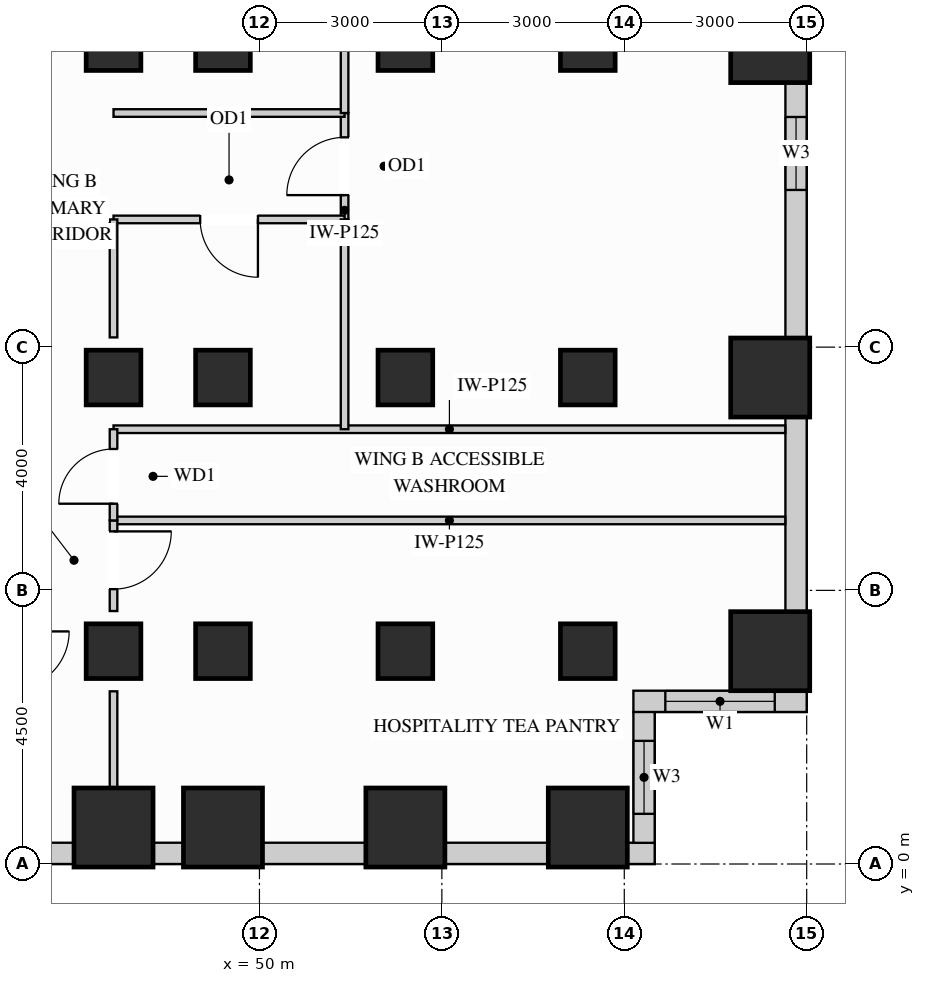
"""IFC4 building model, lengths in metres.
Left out: names, types, materials, properties, quantities, classifications, styles, units other than length and angle.
Written with IfcOpenShell. Run it as: python <this file> out.ifc"""

import sys

from ifc_helpers import new_model, si_unit, direction, frame, frame_2d, origin, origin_2d, place, context, subcontext, project, spatial, rectangle, extrude, source, transform, mapped, element, fill, save


model = new_model("IFC4")
c1 = context("Model", 3, precision=1e-05, world=origin(), true_north=direction((0.0, 1.0)))
c2 = subcontext(c1, "Body", "Model", "MODEL_VIEW")
j1 = project(units=[si_unit("LENGTHUNIT", "METRE"), si_unit("PLANEANGLEUNIT", "RADIAN")], contexts=[c1])
p1 = place(None, origin())
s1 = spatial("IfcSite", under=j1, at=p1, CompositionType="ELEMENT")
p2 = place(p1, origin())
s2 = spatial("IfcBuilding", under=s1, at=p2, CompositionType="ELEMENT")
p3 = place(p2, frame((0.0, 0.0, 62.1)))
s3 = spatial("IfcBuildingStorey", under=s2, at=p3, CompositionType="ELEMENT", Elevation=62.1)
m1 = source(origin(), c2, "Body", "SweptSolid", [
    extrude(rectangle(XDim=0.9, YDim=0.9, at=origin_2d()), origin(), (0.0, 0.0, 1.0), 3.38),
])
for number, where, z_axis, x_axis in (
    (1, (47.6, 13.5, 0.0), (0.0, 0.0, 1.0), (1.0, 0.0, 0.0)),
    (2, (47.6, 3.5, 0.0), (0.0, 0.0, 1.0), (1.0, 0.0, 0.0)),
    (3, (47.6, 8.0, 0.0), (0.0, 0.0, 1.0), (1.0, 0.0, 0.0)),
    (4, (49.4, 13.5, 0.0), (0.0, 0.0, 1.0), (1.0, 0.0, 0.0)),
    (5, (49.4, 3.5, 0.0), (0.0, 0.0, 1.0), (1.0, 0.0, 0.0)),
    (6, (49.4, 8.0, 0.0), (0.0, 0.0, 1.0), (1.0, 0.0, 0.0)),
    (7, (52.4, 13.5, 0.0), (0.0, 0.0, 1.0), (1.0, 0.0, 0.0)),
    (8, (52.4, 3.5, 0.0), (0.0, 0.0, 1.0), (1.0, 0.0, 0.0)),
    (9, (52.4, 8.0, 0.0), (0.0, 0.0, 1.0), (1.0, 0.0, 0.0)),
    (10, (55.4, 13.5, 0.0), (0.0, 0.0, 1.0), (1.0, 0.0, 0.0)),
    (11, (55.4, 3.5, 0.0), (0.0, 0.0, 1.0), (1.0, 0.0, 0.0)),
    (12, (55.4, 8.0, 0.0), (0.0, 0.0, 1.0), (1.0, 0.0, 0.0)),
):
    element("IfcColumn", number, at=place(p3, frame(where, z_axis=z_axis, x_axis=x_axis)), inside=s3, PredefinedType="COLUMN", context=c2, shape_type="MappedRepresentation", body=[
        mapped(m1, transform((0.0, 0.0, 0.0), x_axis=(1.0, 0.0, 0.0), y_axis=(0.0, 1.0, 0.0), z_axis=(0.0, 0.0, 1.0))),
    ])
m2 = source(origin(), c2, "Body", "SweptSolid", [
    extrude(rectangle(XDim=1.3, YDim=1.3, at=origin_2d()), origin(), (0.0, 0.0, 1.0), 3.38),
])
for number, where, z_axis, x_axis in (
    (13, (58.4, 13.5, 0.0), (0.0, 0.0, 1.0), (1.0, 0.0, 0.0)),
    (14, (58.4, 3.5, 0.0), (0.0, 0.0, 1.0), (1.0, 0.0, 0.0)),
    (15, (58.4, 8.0, 0.0), (0.0, 0.0, 1.0), (1.0, 0.0, 0.0)),
    (16, (47.6, 0.6, 0.0), (0.0, 0.0, 1.0), (1.0, 0.0, 0.0)),
    (17, (49.4, 0.6, 0.0), (0.0, 0.0, 1.0), (1.0, 0.0, 0.0)),
    (18, (52.4, 0.6, 0.0), (0.0, 0.0, 1.0), (1.0, 0.0, 0.0)),
    (19, (55.4, 0.6, 0.0), (0.0, 0.0, 1.0), (1.0, 0.0, 0.0)),
):
    element("IfcColumn", number, at=place(p3, frame(where, z_axis=z_axis, x_axis=x_axis)), inside=s3, PredefinedType="COLUMN", context=c2, shape_type="MappedRepresentation", body=[
        mapped(m2, transform((0.0, 0.0, 0.0), x_axis=(1.0, 0.0, 0.0), y_axis=(0.0, 1.0, 0.0), z_axis=(0.0, 0.0, 1.0))),
    ])
p4 = place(p3, frame((40.648, 0.175, 0.0), z_axis=(0.0, 0.0, 1.0), x_axis=(1.0, 0.0, 0.0)))
e20 = element("IfcWall", 20, at=p4, inside=s3, PredefinedType="SOLIDWALL", context=c2, shape_type="SweptSolid", body=[
    extrude(rectangle(XDim=6.304, YDim=0.35, at=frame_2d((3.152, 0.0))), origin(), (0.0, 0.0, 1.0), 2.51),
])
p5 = place(p4, frame((0.687, 0.0, 0.78)))
e21 = element("IfcOpeningElement", 21, at=p5, cuts=e20, PredefinedType="OPENING", context=c2, shape_type="SweptSolid", body=[
    extrude(rectangle(XDim=1.8, YDim=1.55, at=frame_2d((0.9, 0.775))), frame((0.0, 0.185, 0.0), z_axis=(0.0, -1.0, 0.0), x_axis=(1.0, 0.0, 0.0)), (0.0, 0.0, 1.0), 0.37),
])
p6 = place(p4, frame((2.855, 0.0, 0.78)))
e22 = element("IfcOpeningElement", 22, at=p6, cuts=e20, PredefinedType="OPENING", context=c2, shape_type="SweptSolid", body=[
    extrude(rectangle(XDim=1.8, YDim=1.55, at=frame_2d((0.9, 0.775))), frame((0.0, 0.185, 0.0), z_axis=(0.0, -1.0, 0.0), x_axis=(1.0, 0.0, 0.0)), (0.0, 0.0, 1.0), 0.37),
])
m3 = source(origin(), c2, "Body", "SweptSolid", [
    extrude(rectangle(XDim=0.504, YDim=0.35, at=frame_2d((0.252, 0.0))), origin(), (0.0, 0.0, 1.0), 3.365),
])
p7 = place(p3, frame((48.248, 0.175, 0.0), z_axis=(0.0, 0.0, 1.0), x_axis=(1.0, 0.0, 0.0)))
e23 = element("IfcWall", 23, at=p7, inside=s3, PredefinedType="SOLIDWALL", context=c2, shape_type="MappedRepresentation", body=[
    mapped(m3, transform((0.0, 0.0, 0.0), x_axis=(1.0, 0.0, 0.0), y_axis=(0.0, 1.0, 0.0), z_axis=(0.0, 0.0, 1.0))),
])
m4 = source(origin(), c2, "Body", "SweptSolid", [
    extrude(rectangle(XDim=1.704, YDim=0.35, at=frame_2d((0.852, 0.0))), origin(), (0.0, 0.0, 1.0), 2.51),
])
for number, where, z_axis, x_axis in (
    (24, (50.048, 0.175, 0.0), (0.0, 0.0, 1.0), (1.0, 0.0, 0.0)),
    (25, (53.048, 0.175, 0.0), (0.0, 0.0, 1.0), (1.0, 0.0, 0.0)),
):
    element("IfcWall", number, at=place(p3, frame(where, z_axis=z_axis, x_axis=x_axis)), inside=s3, PredefinedType="SOLIDWALL", context=c2, shape_type="MappedRepresentation", body=[
        mapped(m4, transform((0.0, 0.0, 0.0), x_axis=(1.0, 0.0, 0.0), y_axis=(0.0, 1.0, 0.0), z_axis=(0.0, 0.0, 1.0))),
    ])
m5 = source(origin(), c2, "Body", "SweptSolid", [
    extrude(rectangle(XDim=0.452, YDim=0.35, at=frame_2d((0.226, 0.0))), origin(), (0.0, 0.0, 1.0), 3.365),
])
p8 = place(p3, frame((56.048, 0.175, 0.0), z_axis=(0.0, 0.0, 1.0), x_axis=(1.0, 0.0, 0.0)))
e26 = element("IfcWall", 26, at=p8, inside=s3, PredefinedType="SOLIDWALL", context=c2, shape_type="MappedRepresentation", body=[
    mapped(m5, transform((0.0, 0.0, 0.0), x_axis=(1.0, 0.0, 0.0), y_axis=(0.0, 1.0, 0.0), z_axis=(0.0, 0.0, 1.0))),
])
p9 = place(p3, frame((56.325, 0.348, 0.0), z_axis=(0.0, 0.0, 1.0), x_axis=(0.0, 1.0, 0.0)))
e27 = element("IfcWall", 27, at=p9, inside=s3, PredefinedType="SOLIDWALL", context=c2, shape_type="SweptSolid", body=[
    extrude(rectangle(XDim=2.154, YDim=0.35, at=frame_2d((1.077, 0.0))), origin(), (0.0, 0.0, 1.0), 3.365),
])
p10 = place(p9, frame((0.477, 0.0, 0.78)))
e28 = element("IfcOpeningElement", 28, at=p10, cuts=e27, PredefinedType="OPENING", context=c2, shape_type="SweptSolid", body=[
    extrude(rectangle(XDim=1.2, YDim=2.1, at=frame_2d((0.6, 1.05))), frame((0.0, 0.185, 0.0), z_axis=(0.0, -1.0, 0.0), x_axis=(1.0, 0.0, 0.0)), (0.0, 0.0, 1.0), 0.37),
])
p11 = place(p3, frame((56.15, 2.675, 0.0), z_axis=(0.0, 0.0, 1.0), x_axis=(1.0, 0.0, 0.0)))
e29 = element("IfcWall", 29, at=p11, inside=s3, PredefinedType="SOLIDWALL", context=c2, shape_type="SweptSolid", body=[
    extrude(rectangle(XDim=2.85, YDim=0.35, at=frame_2d((1.425, 0.0))), origin(), (0.0, 0.0, 1.0), 3.365),
])
p12 = place(p11, frame((0.525, 0.0, 0.78)))
e30 = element("IfcOpeningElement", 30, at=p12, cuts=e29, PredefinedType="OPENING", context=c2, shape_type="SweptSolid", body=[
    extrude(rectangle(XDim=1.8, YDim=2.1, at=frame_2d((0.9, 1.05))), frame((0.0, 0.185, 0.0), z_axis=(0.0, -1.0, 0.0), x_axis=(1.0, 0.0, 0.0)), (0.0, 0.0, 1.0), 0.37),
])
m6 = source(origin(), c2, "Body", "SweptSolid", [
    extrude(rectangle(XDim=3.204, YDim=0.35, at=frame_2d((1.602, 0.0))), origin(), (0.0, 0.0, 1.0), 2.51),
])
p13 = place(p3, frame((58.825, 4.148, 0.0), z_axis=(0.0, 0.0, 1.0), x_axis=(0.0, 1.0, 0.0)))
e31 = element("IfcWall", 31, at=p13, inside=s3, PredefinedType="SOLIDWALL", context=c2, shape_type="MappedRepresentation", body=[
    mapped(m6, transform((0.0, 0.0, 0.0), x_axis=(1.0, 0.0, 0.0), y_axis=(0.0, 1.0, 0.0), z_axis=(0.0, 0.0, 1.0))),
])
p14 = place(p3, frame((58.825, 8.648, 0.0), z_axis=(0.0, 0.0, 1.0), x_axis=(0.0, 1.0, 0.0)))
e32 = element("IfcWall", 32, at=p14, inside=s3, PredefinedType="SOLIDWALL", context=c2, shape_type="SweptSolid", body=[
    extrude(rectangle(XDim=4.204, YDim=0.35, at=frame_2d((2.102, 0.0))), origin(), (0.0, 0.0, 1.0), 2.51),
])
p15 = place(p14, frame((2.437, 0.0, 0.78)))
e33 = element("IfcOpeningElement", 33, at=p15, cuts=e32, PredefinedType="OPENING", context=c2, shape_type="SweptSolid", body=[
    extrude(rectangle(XDim=1.2, YDim=1.55, at=frame_2d((0.6, 0.775))), frame((0.0, 0.185, 0.0), z_axis=(0.0, -1.0, 0.0), x_axis=(1.0, 0.0, 0.0)), (0.0, 0.0, 1.0), 0.37),
])
p16 = place(p3, frame((51.4, 10.6, 0.0), z_axis=(0.0, 0.0, 1.0), x_axis=(0.0, 1.0, 0.0)))
e34 = element("IfcWall", 34, at=p16, inside=s3, PredefinedType="PARTITIONING", context=c2, shape_type="SweptSolid", body=[
    extrude(rectangle(XDim=1.75, YDim=0.125, at=frame_2d((0.875, 0.0))), origin(), (0.0, 0.0, 1.0), 3.365),
])
p17 = place(p16, frame((0.4, 0.0, 0.0)))
e35 = element("IfcOpeningElement", 35, at=p17, cuts=e34, PredefinedType="OPENING", context=c2, shape_type="SweptSolid", body=[
    extrude(rectangle(XDim=0.95, YDim=2.15, at=frame_2d((0.475, 1.075))), frame((0.0, 0.073, 0.0), z_axis=(0.0, -1.0, 0.0), x_axis=(1.0, 0.0, 0.0)), (0.0, 0.0, 1.0), 0.145),
])
m7 = source(origin(), c2, "Body", "SweptSolid", [
    extrude(rectangle(XDim=11.048, YDim=0.125, at=frame_2d((5.524, 0.0))), origin(), (0.0, 0.0, 1.0), 3.365),
])
for number, where, z_axis, x_axis in (
    (36, (47.6, 5.65, 0.0), (0.0, 0.0, 1.0), (1.0, 0.0, 0.0)),
    (37, (47.6, 7.15, 0.0), (0.0, 0.0, 1.0), (1.0, 0.0, 0.0)),
):
    element("IfcWall", number, at=place(p3, frame(where, z_axis=z_axis, x_axis=x_axis)), inside=s3, PredefinedType="PARTITIONING", context=c2, shape_type="MappedRepresentation", body=[
        mapped(m7, transform((0.0, 0.0, 0.0), x_axis=(1.0, 0.0, 0.0), y_axis=(0.0, 1.0, 0.0), z_axis=(0.0, 0.0, 1.0))),
    ])
m8 = source(origin(), c2, "Body", "SweptSolid", [
    extrude(rectangle(XDim=3.8, YDim=0.125, at=frame_2d((1.9, 0.0))), origin(), (0.0, 0.0, 1.0), 3.365),
])
p18 = place(p3, frame((47.6, 12.35, 0.0), z_axis=(0.0, 0.0, 1.0), x_axis=(1.0, 0.0, 0.0)))
e38 = element("IfcWall", 38, at=p18, inside=s3, PredefinedType="PARTITIONING", context=c2, shape_type="MappedRepresentation", body=[
    mapped(m8, transform((0.0, 0.0, 0.0), x_axis=(1.0, 0.0, 0.0), y_axis=(0.0, 1.0, 0.0), z_axis=(0.0, 0.0, 1.0))),
])
p19 = place(p3, frame((47.6, 10.6, 0.0), z_axis=(0.0, 0.0, 1.0), x_axis=(1.0, 0.0, 0.0)))
e39 = element("IfcWall", 39, at=p19, inside=s3, PredefinedType="PARTITIONING", context=c2, shape_type="SweptSolid", body=[
    extrude(rectangle(XDim=3.8, YDim=0.125, at=frame_2d((1.9, 0.0))), origin(), (0.0, 0.0, 1.0), 2.67),
])
p20 = place(p19, frame((1.425, 0.0, 0.0)))
e40 = element("IfcOpeningElement", 40, at=p20, cuts=e39, PredefinedType="OPENING", context=c2, shape_type="SweptSolid", body=[
    extrude(rectangle(XDim=0.95, YDim=2.15, at=frame_2d((0.475, 1.075))), frame((0.0, 0.073, 0.0), z_axis=(0.0, -1.0, 0.0), x_axis=(1.0, 0.0, 0.0)), (0.0, 0.0, 1.0), 0.145),
])
m9 = source(origin(), c2, "Body", "SweptSolid", [
    extrude(rectangle(XDim=3.45, YDim=0.125, at=frame_2d((1.725, 0.0))), origin(), (0.0, 0.0, 1.0), 3.365),
])
p21 = place(p3, frame((51.4, 7.15, 0.0), z_axis=(0.0, 0.0, 1.0), x_axis=(0.0, 1.0, 0.0)))
e41 = element("IfcWall", 41, at=p21, inside=s3, PredefinedType="PARTITIONING", context=c2, shape_type="MappedRepresentation", body=[
    mapped(m9, transform((0.0, 0.0, 0.0), x_axis=(1.0, 0.0, 0.0), y_axis=(0.0, 1.0, 0.0), z_axis=(0.0, 0.0, 1.0))),
])
m10 = source(origin(), c2, "Body", "SweptSolid", [
    extrude(rectangle(XDim=9.79, YDim=0.125, at=frame_2d((4.895, 0.0))), origin(), (0.0, 0.0, 1.0), 3.365),
])
p22 = place(p3, frame((51.4, 12.35, 0.0), z_axis=(0.0, 0.0, 1.0), x_axis=(0.0, 1.0, 0.0)))
e42 = element("IfcWall", 42, at=p22, inside=s3, PredefinedType="PARTITIONING", context=c2, shape_type="MappedRepresentation", body=[
    mapped(m10, transform((0.0, 0.0, 0.0), x_axis=(1.0, 0.0, 0.0), y_axis=(0.0, 1.0, 0.0), z_axis=(0.0, 0.0, 1.0))),
])
p23 = place(p3, frame((47.6, 4.16, 0.0), z_axis=(0.0, 0.0, 1.0), x_axis=(0.0, 1.0, 0.0)))
e43 = element("IfcWall", 43, at=p23, inside=s3, PredefinedType="PARTITIONING", context=c2, shape_type="SweptSolid", body=[
    extrude(rectangle(XDim=1.49, YDim=0.125, at=frame_2d((0.745, 0.0))), origin(), (0.0, 0.0, 1.0), 2.67),
])
p24 = place(p23, frame((0.36, 0.0, 0.0)))
e44 = element("IfcOpeningElement", 44, at=p24, cuts=e43, PredefinedType="OPENING", context=c2, shape_type="SweptSolid", body=[
    extrude(rectangle(XDim=0.95, YDim=2.15, at=frame_2d((0.475, 1.075))), frame((0.0, 0.073, 0.0), z_axis=(0.0, -1.0, 0.0), x_axis=(1.0, 0.0, 0.0)), (0.0, 0.0, 1.0), 0.145),
])
m11 = source(origin(), c2, "Body", "SweptSolid", [
    extrude(rectangle(XDim=1.58, YDim=0.125, at=frame_2d((0.79, 0.0))), origin(), (0.0, 0.0, 1.0), 2.67),
])
p25 = place(p3, frame((47.6, 1.26, 0.0), z_axis=(0.0, 0.0, 1.0), x_axis=(0.0, 1.0, 0.0)))
e45 = element("IfcWall", 45, at=p25, inside=s3, PredefinedType="PARTITIONING", context=c2, shape_type="MappedRepresentation", body=[
    mapped(m11, transform((0.0, 0.0, 0.0), x_axis=(1.0, 0.0, 0.0), y_axis=(0.0, 1.0, 0.0), z_axis=(0.0, 0.0, 1.0))),
])
m12 = source(origin(), c2, "Body", "SweptSolid", [
    extrude(rectangle(XDim=1.94, YDim=0.125, at=frame_2d((0.97, 0.0))), origin(), (0.0, 0.0, 1.0), 2.67),
])
p26 = place(p3, frame((47.6, 8.66, 0.0), z_axis=(0.0, 0.0, 1.0), x_axis=(0.0, 1.0, 0.0)))
e46 = element("IfcWall", 46, at=p26, inside=s3, PredefinedType="PARTITIONING", context=c2, shape_type="MappedRepresentation", body=[
    mapped(m12, transform((0.0, 0.0, 0.0), x_axis=(1.0, 0.0, 0.0), y_axis=(0.0, 1.0, 0.0), z_axis=(0.0, 0.0, 1.0))),
])
p27 = place(p3, frame((47.6, 5.65, 0.0), z_axis=(0.0, 0.0, 1.0), x_axis=(0.0, 1.0, 0.0)))
e47 = element("IfcWall", 47, at=p27, inside=s3, PredefinedType="PARTITIONING", context=c2, shape_type="SweptSolid", body=[
    extrude(rectangle(XDim=1.5, YDim=0.125, at=frame_2d((0.75, 0.0))), origin(), (0.0, 0.0, 1.0), 2.67),
])
p28 = place(p27, frame((0.275, 0.0, 0.0)))
e48 = element("IfcOpeningElement", 48, at=p28, cuts=e47, PredefinedType="OPENING", context=c2, shape_type="SweptSolid", body=[
    extrude(rectangle(XDim=0.9, YDim=2.15, at=frame_2d((0.45, 1.075))), frame((0.0, 0.073, 0.0), z_axis=(0.0, -1.0, 0.0), x_axis=(1.0, 0.0, 0.0)), (0.0, 0.0, 1.0), 0.145),
])
m13 = source(origin(), c2, "Body", "SweptSolid", [
    extrude(rectangle(XDim=0.95, YDim=2.15, at=frame_2d((0.475, 1.075))), frame((0.0, 0.025, 0.0), z_axis=(0.0, -1.0, 0.0), x_axis=(1.0, 0.0, 0.0)), (0.0, 0.0, 1.0), 0.05),
])
p29 = place(p24, origin())
e49 = element("IfcDoor", 49, at=p29, inside=s3, OperationType="SINGLE_SWING_RIGHT", PredefinedType="DOOR", context=c2, shape_type="MappedRepresentation", body=[
    mapped(m13, transform((0.0, 0.0, 0.0), x_axis=(1.0, 0.0, 0.0), y_axis=(0.0, 1.0, 0.0), z_axis=(0.0, 0.0, 1.0))),
])
fill(e44, e49)
p30 = place(p20, origin())
e50 = element("IfcDoor", 50, at=p30, inside=s3, OperationType="SINGLE_SWING_RIGHT", PredefinedType="DOOR", context=c2, shape_type="MappedRepresentation", body=[
    mapped(m13, transform((0.0, 0.0, 0.0), x_axis=(1.0, 0.0, 0.0), y_axis=(0.0, 1.0, 0.0), z_axis=(0.0, 0.0, 1.0))),
])
fill(e40, e50)
p31 = place(p17, origin())
e51 = element("IfcDoor", 51, at=p31, inside=s3, OperationType="SINGLE_SWING_LEFT", PredefinedType="DOOR", context=c2, shape_type="MappedRepresentation", body=[
    mapped(m13, transform((0.0, 0.0, 0.0), x_axis=(1.0, 0.0, 0.0), y_axis=(0.0, 1.0, 0.0), z_axis=(0.0, 0.0, 1.0))),
])
fill(e35, e51)
m14 = source(origin(), c2, "Body", "SweptSolid", [
    extrude(rectangle(XDim=0.9, YDim=2.15, at=frame_2d((0.45, 1.075))), frame((0.0, 0.025, 0.0), z_axis=(0.0, -1.0, 0.0), x_axis=(1.0, 0.0, 0.0)), (0.0, 0.0, 1.0), 0.05),
])
p32 = place(p28, origin())
e52 = element("IfcDoor", 52, at=p32, inside=s3, OperationType="SINGLE_SWING_LEFT", PredefinedType="DOOR", context=c2, shape_type="MappedRepresentation", body=[
    mapped(m14, transform((0.0, 0.0, 0.0), x_axis=(1.0, 0.0, 0.0), y_axis=(0.0, 1.0, 0.0), z_axis=(0.0, 0.0, 1.0))),
])
fill(e48, e52)
m15 = source(origin(), c2, "Body", "SweptSolid", [
    extrude(rectangle(XDim=1.8, YDim=2.1, at=frame_2d((0.9, 1.05))), frame((0.0, 0.03, 0.0), z_axis=(0.0, -1.0, 0.0), x_axis=(1.0, 0.0, 0.0)), (0.0, 0.0, 1.0), 0.06),
])
p33 = place(p12, origin())
e53 = element("IfcWindow", 53, at=p33, inside=s3, PartitioningType="SINGLE_PANEL", PredefinedType="WINDOW", context=c2, shape_type="MappedRepresentation", body=[
    mapped(m15, transform((0.0, 0.0, 0.0), x_axis=(1.0, 0.0, 0.0), y_axis=(0.0, 1.0, 0.0), z_axis=(0.0, 0.0, 1.0))),
])
fill(e30, e53)
m16 = source(origin(), c2, "Body", "SweptSolid", [
    extrude(rectangle(XDim=1.2, YDim=2.1, at=frame_2d((0.6, 1.05))), frame((0.0, 0.03, 0.0), z_axis=(0.0, -1.0, 0.0), x_axis=(1.0, 0.0, 0.0)), (0.0, 0.0, 1.0), 0.06),
])
p34 = place(p10, origin())
e54 = element("IfcWindow", 54, at=p34, inside=s3, PartitioningType="SINGLE_PANEL", PredefinedType="WINDOW", context=c2, shape_type="MappedRepresentation", body=[
    mapped(m16, transform((0.0, 0.0, 0.0), x_axis=(1.0, 0.0, 0.0), y_axis=(0.0, 1.0, 0.0), z_axis=(0.0, 0.0, 1.0))),
])
fill(e28, e54)
m17 = source(origin(), c2, "Body", "SweptSolid", [
    extrude(rectangle(XDim=1.2, YDim=1.55, at=frame_2d((0.6, 0.775))), frame((0.0, 0.03, 0.0), z_axis=(0.0, -1.0, 0.0), x_axis=(1.0, 0.0, 0.0)), (0.0, 0.0, 1.0), 0.06),
])
p35 = place(p15, origin())
e55 = element("IfcWindow", 55, at=p35, inside=s3, PartitioningType="SINGLE_PANEL", PredefinedType="WINDOW", context=c2, shape_type="MappedRepresentation", body=[
    mapped(m17, transform((0.0, 0.0, 0.0), x_axis=(1.0, 0.0, 0.0), y_axis=(0.0, 1.0, 0.0), z_axis=(0.0, 0.0, 1.0))),
])
fill(e33, e55)
save(model, sys.argv[1])
